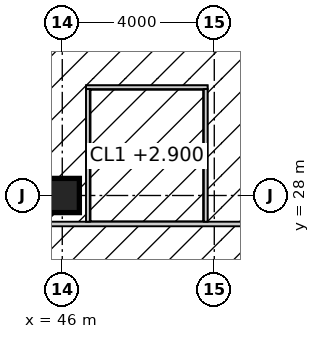
"""IFC4 building model, lengths in metres.
Left out: names, types, materials, properties, quantities, classifications, styles, units other than length and angle.
Written with IfcOpenShell. Run it as: python <this file> out.ifc"""

import sys

from ifc_helpers import new_model, si_unit, direction, frame, frame_2d, origin, origin_2d, place, context, subcontext, project, spatial, rectangle, hollow_rectangle, extrude, element, fill, save


model = new_model("IFC4")
c1 = context("Model", 3, precision=1e-05, world=origin(), true_north=direction((0.0, 1.0)))
c2 = subcontext(c1, "Body", "Model", "MODEL_VIEW")
j1 = project(units=[si_unit("LENGTHUNIT", "METRE"), si_unit("PLANEANGLEUNIT", "RADIAN")], contexts=[c1])
p1 = place(None, origin())
s1 = spatial("IfcSite", under=j1, at=p1, CompositionType="ELEMENT")
p2 = place(p1, origin())
s2 = spatial("IfcBuilding", under=s1, at=p2, CompositionType="ELEMENT")
p3 = place(p2, frame((0.0, 0.0, 121.4)))
s3 = spatial("IfcBuildingStorey", under=s2, at=p3, CompositionType="ELEMENT", Elevation=121.4)
p4 = place(p3, frame((46.0, 28.0, 0.0), z_axis=(0.0, 0.0, 1.0), x_axis=(1.0, 0.0, 0.0)))
e1 = element("IfcColumn", 1, at=p4, inside=s3, PredefinedType="COLUMN", context=c2, shape_type="SweptSolid", body=[
    extrude(hollow_rectangle(XDim=0.9, YDim=0.9, WallThickness=0.1, at=origin_2d()), origin(), (0.0, 0.0, 1.0), 4.0),
])
p5 = place(p3, frame((37.975, 27.25, 0.0), z_axis=(0.0, 0.0, 1.0), x_axis=(1.0, 0.0, 0.0)))
e2 = element("IfcWall", 2, at=p5, inside=s3, PredefinedType="PARTITIONING", context=c2, shape_type="SweptSolid", body=[
    extrude(rectangle(XDim=19.725, YDim=0.12, at=frame_2d((9.862, 0.0))), origin(), (0.0, 0.0, 1.0), 3.85),
])
p6 = place(p3, frame((46.625, 30.85, 0.0), z_axis=(0.0, 0.0, 1.0), x_axis=(1.0, 0.0, 0.0)))
e3 = element("IfcWall", 3, at=p6, inside=s3, PredefinedType="PARTITIONING", context=c2, shape_type="SweptSolid", body=[
    extrude(rectangle(XDim=3.2, YDim=0.1, at=frame_2d((1.6, 0.0))), origin(), (0.0, 0.0, 1.0), 3.85),
])
p7 = place(p6, frame((1.1, 0.0, 0.0)))
e4 = element("IfcOpeningElement", 4, at=p7, cuts=e3, PredefinedType="OPENING", context=c2, shape_type="SweptSolid", body=[
    extrude(rectangle(XDim=1.0, YDim=2.2, at=frame_2d((0.5, 1.1))), frame((0.0, 0.06, 0.0), z_axis=(0.0, -1.0, 0.0), x_axis=(1.0, 0.0, 0.0)), (0.0, 0.0, 1.0), 0.12),
])
for number, where, z_axis, x_axis in (
    (5, (46.675, 27.31, 0.0), (0.0, 0.0, 1.0), (0.0, 1.0, 0.0)),
    (6, (49.775, 27.31, 0.0), (0.0, 0.0, 1.0), (0.0, 1.0, 0.0)),
):
    element("IfcWall", number, at=place(p3, frame(where, z_axis=z_axis, x_axis=x_axis)), inside=s3, PredefinedType="PARTITIONING", context=c2, shape_type="SweptSolid", body=[
        extrude(rectangle(XDim=3.49, YDim=0.1, at=frame_2d((1.745, 0.0))), origin(), (0.0, 0.0, 1.0), 3.85),
    ])
p8 = place(p7, origin())
e7 = element("IfcDoor", 7, at=p8, inside=s3, OperationType="SINGLE_SWING_LEFT", PredefinedType="DOOR", context=c2, shape_type="SweptSolid", body=[
    extrude(rectangle(XDim=1.0, YDim=2.2, at=frame_2d((0.5, 1.1))), frame((0.0, 0.025, 0.0), z_axis=(0.0, -1.0, 0.0), x_axis=(1.0, 0.0, 0.0)), (0.0, 0.0, 1.0), 0.05),
])
fill(e4, e7)
save(model, sys.argv[1])
